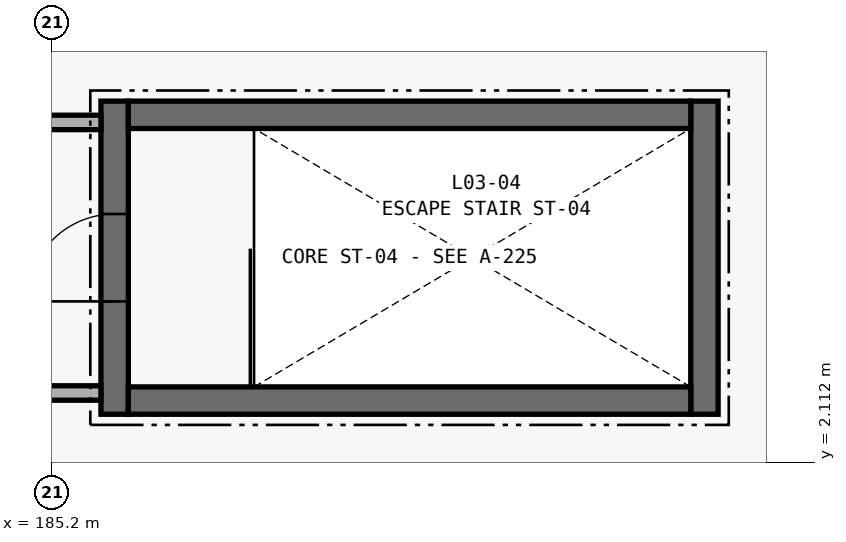
"""IFC4 building model, lengths in metres.
Left out: names, types, materials, properties, quantities, classifications, styles, units other than length and angle.
Written with IfcOpenShell. Run it as: python <this file> out.ifc"""

import sys

from ifc_helpers import new_model, si_unit, direction, frame, frame_2d, origin, place, context, subcontext, project, spatial, rectangle, extrude, element, fill, save


model = new_model("IFC4")
c1 = context("Model", 3, precision=1e-05, world=origin(), true_north=direction((0.0, 1.0)))
c2 = subcontext(c1, "Body", "Model", "MODEL_VIEW")
j1 = project(units=[si_unit("LENGTHUNIT", "METRE"), si_unit("PLANEANGLEUNIT", "RADIAN")], contexts=[c1])
p1 = place(None, origin())
s1 = spatial("IfcSite", under=j1, at=p1, CompositionType="ELEMENT")
p2 = place(p1, origin())
s2 = spatial("IfcBuilding", under=s1, at=p2, CompositionType="ELEMENT")
p3 = place(p2, frame((0.0, 0.0, 17.1)))
s3 = spatial("IfcBuildingStorey", under=s2, at=p3, CompositionType="ELEMENT", Elevation=17.1)
p4 = place(p3, frame((186.02, 2.74, 0.0), z_axis=(0.0, 0.0, 1.0), x_axis=(0.0, 1.0, 0.0)))
e1 = element("IfcWall", 1, at=p4, inside=s3, PredefinedType="SHEAR", context=c2, shape_type="SweptSolid", body=[
    extrude(rectangle(XDim=4.12, YDim=0.36, at=frame_2d((2.06, 0.0))), origin(), (0.0, 0.0, 1.0), 3.94),
])
p5 = place(p4, frame((1.485, 0.0, 0.0)))
e2 = element("IfcOpeningElement", 2, at=p5, cuts=e1, PredefinedType="OPENING", context=c2, shape_type="SweptSolid", body=[
    extrude(rectangle(XDim=1.15, YDim=2.15, at=frame_2d((0.575, 1.075))), frame((0.0, 0.195, 0.0), z_axis=(0.0, -1.0, 0.0), x_axis=(1.0, 0.0, 0.0)), (0.0, 0.0, 1.0), 0.39),
])
p6 = place(p3, frame((193.78, 2.74, 0.0), z_axis=(0.0, 0.0, 1.0), x_axis=(0.0, 1.0, 0.0)))
e3 = element("IfcWall", 3, at=p6, inside=s3, PredefinedType="SHEAR", context=c2, shape_type="SweptSolid", body=[
    extrude(rectangle(XDim=4.12, YDim=0.36, at=frame_2d((2.06, 0.0))), origin(), (0.0, 0.0, 1.0), 3.94),
])
for number, where, z_axis, x_axis in (
    (4, (186.2, 6.68, 0.0), (0.0, 0.0, 1.0), (1.0, 0.0, 0.0)),
    (5, (186.2, 2.92, 0.0), (0.0, 0.0, 1.0), (1.0, 0.0, 0.0)),
):
    element("IfcWall", number, at=place(p3, frame(where, z_axis=z_axis, x_axis=x_axis)), inside=s3, PredefinedType="SHEAR", context=c2, shape_type="SweptSolid", body=[
        extrude(rectangle(XDim=7.4, YDim=0.36, at=frame_2d((3.7, 0.0))), origin(), (0.0, 0.0, 1.0), 3.94),
    ])
p7 = place(p3, frame((181.825, 3.02, 0.0), z_axis=(0.0, 0.0, 1.0), x_axis=(1.0, 0.0, 0.0)))
e6 = element("IfcWall", 6, at=p7, inside=s3, PredefinedType="PARTITIONING", context=c2, shape_type="SweptSolid", body=[
    extrude(rectangle(XDim=4.015, YDim=0.19, at=frame_2d((2.008, 0.0))), origin(), (0.0, 0.0, 1.0), 2.82),
])
p8 = place(p3, frame((184.685, 6.58, 0.0), z_axis=(0.0, 0.0, 1.0), x_axis=(1.0, 0.0, 0.0)))
e7 = element("IfcWall", 7, at=p8, inside=s3, PredefinedType="PARTITIONING", context=c2, shape_type="SweptSolid", body=[
    extrude(rectangle(XDim=1.155, YDim=0.19, at=frame_2d((0.578, 0.0))), origin(), (0.0, 0.0, 1.0), 2.82),
])
p9 = place(p5, origin())
e8 = element("IfcDoor", 8, at=p9, inside=s3, OperationType="SINGLE_SWING_LEFT", PredefinedType="DOOR", context=c2, shape_type="SweptSolid", body=[
    extrude(rectangle(XDim=1.15, YDim=2.15, at=frame_2d((0.575, 1.075))), frame((0.0, 0.025, 0.0), z_axis=(0.0, -1.0, 0.0), x_axis=(1.0, 0.0, 0.0)), (0.0, 0.0, 1.0), 0.05),
])
fill(e2, e8)
save(model, sys.argv[1])
